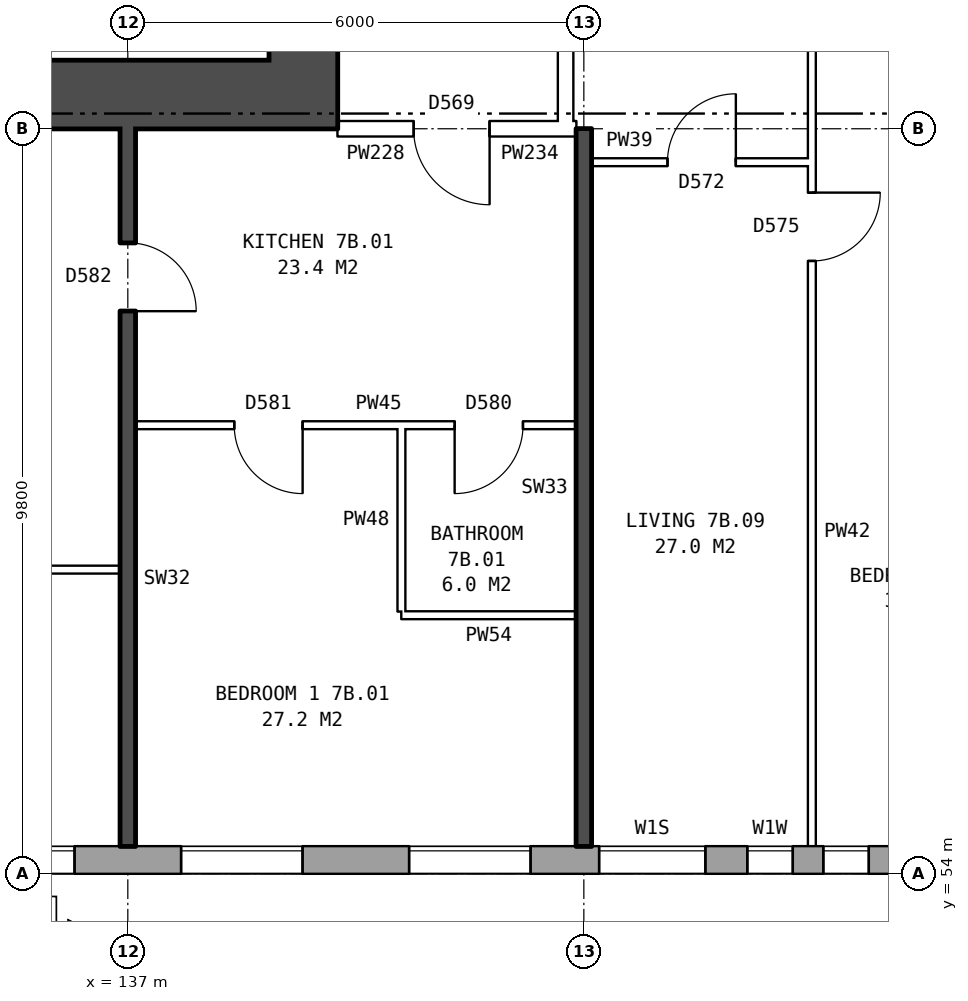
"""IFC4 building model, lengths in metres.
Left out: names, types, materials, properties, quantities, classifications, styles, units other than length and angle.
Written with IfcOpenShell. Run it as: python <this file> out.ifc"""

import sys

from ifc_helpers import new_model, si_unit, direction, frame, frame_2d, origin, place, context, subcontext, project, spatial, rectangle, extrude, element, fill, save


model = new_model("IFC4")
c1 = context("Model", 3, precision=1e-05, world=origin(), true_north=direction((0.0, 1.0)))
c2 = subcontext(c1, "Body", "Model", "MODEL_VIEW")
j1 = project(units=[si_unit("LENGTHUNIT", "METRE"), si_unit("PLANEANGLEUNIT", "RADIAN")], contexts=[c1])
p1 = place(None, origin())
s1 = spatial("IfcSite", under=j1, at=p1, CompositionType="ELEMENT")
p2 = place(p1, origin())
s2 = spatial("IfcBuilding", under=s1, at=p2, CompositionType="ELEMENT")
p3 = place(p2, frame((0.0, 0.0, 28.8)))
s3 = spatial("IfcBuildingStorey", under=s2, at=p3, CompositionType="ELEMENT", Elevation=28.8)
p4 = place(p3, frame((134.075, 54.18, 0.0), z_axis=(0.0, 0.0, 1.0), x_axis=(1.0, 0.0, 0.0)))
e1 = element("IfcWall", 1, at=p4, inside=s3, PredefinedType="STANDARD", context=c2, shape_type="SweptSolid", body=[
    extrude(rectangle(XDim=40.601, YDim=0.36, at=frame_2d((20.3, 0.0))), origin(), (0.0, 0.0, 1.0), 2.85),
])
p5 = place(p4, frame((0.625, 0.0, 0.8)))
e2 = element("IfcOpeningElement", 2, at=p5, cuts=e1, PredefinedType="OPENING", context=c2, shape_type="SweptSolid", body=[
    extrude(rectangle(XDim=1.6, YDim=1.8, at=frame_2d((0.8, 0.9))), frame((0.0, 0.19, 0.0), z_axis=(0.0, -1.0, 0.0), x_axis=(1.0, 0.0, 0.0)), (0.0, 0.0, 1.0), 0.38),
])
p6 = place(p4, frame((3.625, 0.0, 0.8)))
e3 = element("IfcOpeningElement", 3, at=p6, cuts=e1, PredefinedType="OPENING", context=c2, shape_type="SweptSolid", body=[
    extrude(rectangle(XDim=1.6, YDim=1.8, at=frame_2d((0.8, 0.9))), frame((0.0, 0.19, 0.0), z_axis=(0.0, -1.0, 0.0), x_axis=(1.0, 0.0, 0.0)), (0.0, 0.0, 1.0), 0.38),
])
p7 = place(p4, frame((6.625, 0.0, 0.8)))
e4 = element("IfcOpeningElement", 4, at=p7, cuts=e1, PredefinedType="OPENING", context=c2, shape_type="SweptSolid", body=[
    extrude(rectangle(XDim=1.6, YDim=1.8, at=frame_2d((0.8, 0.9))), frame((0.0, 0.19, 0.0), z_axis=(0.0, -1.0, 0.0), x_axis=(1.0, 0.0, 0.0)), (0.0, 0.0, 1.0), 0.38),
])
p8 = place(p4, frame((9.125, 0.0, 1.65)))
e5 = element("IfcOpeningElement", 5, at=p8, cuts=e1, PredefinedType="OPENING", context=c2, shape_type="SweptSolid", body=[
    extrude(rectangle(XDim=1.4, YDim=0.9, at=frame_2d((0.7, 0.45))), frame((0.0, 0.19, 0.0), z_axis=(0.0, -1.0, 0.0), x_axis=(1.0, 0.0, 0.0)), (0.0, 0.0, 1.0), 0.38),
])
p9 = place(p4, frame((12.075, 0.0, 0.8)))
e6 = element("IfcOpeningElement", 6, at=p9, cuts=e1, PredefinedType="OPENING", context=c2, shape_type="SweptSolid", body=[
    extrude(rectangle(XDim=0.6, YDim=0.9, at=frame_2d((0.3, 0.45))), frame((0.0, 0.19, 0.0), z_axis=(0.0, -1.0, 0.0), x_axis=(1.0, 0.0, 0.0)), (0.0, 0.0, 1.0), 0.38),
])
p10 = place(p4, frame((15.625, 0.0, 0.8)))
e7 = element("IfcOpeningElement", 7, at=p10, cuts=e1, PredefinedType="OPENING", context=c2, shape_type="SweptSolid", body=[
    extrude(rectangle(XDim=1.6, YDim=1.8, at=frame_2d((0.8, 0.9))), frame((0.0, 0.19, 0.0), z_axis=(0.0, -1.0, 0.0), x_axis=(1.0, 0.0, 0.0)), (0.0, 0.0, 1.0), 0.38),
])
p11 = place(p4, frame((18.625, 0.0, 0.8)))
e8 = element("IfcOpeningElement", 8, at=p11, cuts=e1, PredefinedType="OPENING", context=c2, shape_type="SweptSolid", body=[
    extrude(rectangle(XDim=1.6, YDim=1.8, at=frame_2d((0.8, 0.9))), frame((0.0, 0.19, 0.0), z_axis=(0.0, -1.0, 0.0), x_axis=(1.0, 0.0, 0.0)), (0.0, 0.0, 1.0), 0.38),
])
p12 = place(p4, frame((21.625, 0.0, 0.8)))
e9 = element("IfcOpeningElement", 9, at=p12, cuts=e1, PredefinedType="OPENING", context=c2, shape_type="SweptSolid", body=[
    extrude(rectangle(XDim=1.6, YDim=1.8, at=frame_2d((0.8, 0.9))), frame((0.0, 0.19, 0.0), z_axis=(0.0, -1.0, 0.0), x_axis=(1.0, 0.0, 0.0)), (0.0, 0.0, 1.0), 0.38),
])
p13 = place(p4, frame((24.625, 0.0, 0.8)))
e10 = element("IfcOpeningElement", 10, at=p13, cuts=e1, PredefinedType="OPENING", context=c2, shape_type="SweptSolid", body=[
    extrude(rectangle(XDim=1.6, YDim=1.8, at=frame_2d((0.8, 0.9))), frame((0.0, 0.19, 0.0), z_axis=(0.0, -1.0, 0.0), x_axis=(1.0, 0.0, 0.0)), (0.0, 0.0, 1.0), 0.38),
])
p14 = place(p4, frame((27.125, 0.0, 0.65)))
e11 = element("IfcOpeningElement", 11, at=p14, cuts=e1, PredefinedType="OPENING", context=c2, shape_type="SweptSolid", body=[
    extrude(rectangle(XDim=0.6, YDim=1.8, at=frame_2d((0.3, 0.9))), frame((0.0, 0.19, 0.0), z_axis=(0.0, -1.0, 0.0), x_axis=(1.0, 0.0, 0.0)), (0.0, 0.0, 1.0), 0.38),
])
p15 = place(p4, frame((30.125, 0.0, 1.6)))
e12 = element("IfcOpeningElement", 12, at=p15, cuts=e1, PredefinedType="OPENING", context=c2, shape_type="SweptSolid", body=[
    extrude(rectangle(XDim=0.6, YDim=0.9, at=frame_2d((0.3, 0.45))), frame((0.0, 0.19, 0.0), z_axis=(0.0, -1.0, 0.0), x_axis=(1.0, 0.0, 0.0)), (0.0, 0.0, 1.0), 0.38),
])
p16 = place(p4, frame((33.625, 0.0, 0.8)))
e13 = element("IfcOpeningElement", 13, at=p16, cuts=e1, PredefinedType="OPENING", context=c2, shape_type="SweptSolid", body=[
    extrude(rectangle(XDim=1.6, YDim=1.8, at=frame_2d((0.8, 0.9))), frame((0.0, 0.19, 0.0), z_axis=(0.0, -1.0, 0.0), x_axis=(1.0, 0.0, 0.0)), (0.0, 0.0, 1.0), 0.38),
])
p17 = place(p4, frame((36.625, 0.0, 0.8)))
e14 = element("IfcOpeningElement", 14, at=p17, cuts=e1, PredefinedType="OPENING", context=c2, shape_type="SweptSolid", body=[
    extrude(rectangle(XDim=1.6, YDim=1.8, at=frame_2d((0.8, 0.9))), frame((0.0, 0.19, 0.0), z_axis=(0.0, -1.0, 0.0), x_axis=(1.0, 0.0, 0.0)), (0.0, 0.0, 1.0), 0.38),
])
p18 = place(p4, frame((11.075, 0.0, 0.15)))
e15 = element("IfcOpeningElement", 15, at=p18, cuts=e1, PredefinedType="OPENING", context=c2, shape_type="SweptSolid", body=[
    extrude(rectangle(XDim=0.6, YDim=0.9, at=frame_2d((0.3, 0.45))), frame((0.0, 0.19, 0.0), z_axis=(0.0, -1.0, 0.0), x_axis=(1.0, 0.0, 0.0)), (0.0, 0.0, 1.0), 0.38),
])
p19 = place(p4, frame((13.025, 0.0, 0.8)))
e16 = element("IfcOpeningElement", 16, at=p19, cuts=e1, PredefinedType="OPENING", context=c2, shape_type="SweptSolid", body=[
    extrude(rectangle(XDim=1.6, YDim=1.8, at=frame_2d((0.8, 0.9))), frame((0.0, 0.19, 0.0), z_axis=(0.0, -1.0, 0.0), x_axis=(1.0, 0.0, 0.0)), (0.0, 0.0, 1.0), 0.38),
])
p20 = place(p4, frame((28.025, 0.0, 0.65)))
e17 = element("IfcOpeningElement", 17, at=p20, cuts=e1, PredefinedType="OPENING", context=c2, shape_type="SweptSolid", body=[
    extrude(rectangle(XDim=0.8, YDim=0.9, at=frame_2d((0.4, 0.45))), frame((0.0, 0.19, 0.0), z_axis=(0.0, -1.0, 0.0), x_axis=(1.0, 0.0, 0.0)), (0.0, 0.0, 1.0), 0.38),
])
p21 = place(p4, frame((31.075, 0.0, 0.8)))
e18 = element("IfcOpeningElement", 18, at=p21, cuts=e1, PredefinedType="OPENING", context=c2, shape_type="SweptSolid", body=[
    extrude(rectangle(XDim=1.6, YDim=1.8, at=frame_2d((0.8, 0.9))), frame((0.0, 0.19, 0.0), z_axis=(0.0, -1.0, 0.0), x_axis=(1.0, 0.0, 0.0)), (0.0, 0.0, 1.0), 0.38),
])
p22 = place(p3, frame((139.31, 64.7, 0.0), z_axis=(0.0, 0.0, 1.0), x_axis=(0.0, 1.0, 0.0)))
e19 = element("IfcWall", 19, at=p22, inside=s3, PredefinedType="SHEAR", context=c2, shape_type="SweptSolid", body=[
    extrude(rectangle(XDim=10.6, YDim=0.9, at=frame_2d((5.3, 0.0))), origin(), (0.0, 0.0, 1.0), 2.85),
])
p23 = place(p22, frame((0.425, 0.0, 0.0)))
e20 = element("IfcOpeningElement", 20, at=p23, cuts=e19, PredefinedType="OPENING", context=c2, shape_type="SweptSolid", body=[
    extrude(rectangle(XDim=1.1, YDim=2.1, at=frame_2d((0.55, 1.05))), frame((0.0, 0.46, 0.0), z_axis=(0.0, -1.0, 0.0), x_axis=(1.0, 0.0, 0.0)), (0.0, 0.0, 1.0), 0.92),
])
p24 = place(p22, frame((9.0, 0.0, 0.0)))
e21 = element("IfcOpeningElement", 21, at=p24, cuts=e19, PredefinedType="OPENING", context=c2, shape_type="SweptSolid", body=[
    extrude(rectangle(XDim=1.1, YDim=2.1, at=frame_2d((0.55, 1.05))), frame((0.0, 0.46, 0.0), z_axis=(0.0, -1.0, 0.0), x_axis=(1.0, 0.0, 0.0)), (0.0, 0.0, 1.0), 0.92),
])
p25 = place(p22, frame((7.225, 0.0, 0.0)))
e22 = element("IfcOpeningElement", 22, at=p25, cuts=e19, PredefinedType="OPENING", context=c2, shape_type="SweptSolid", body=[
    extrude(rectangle(XDim=0.85, YDim=2.1, at=frame_2d((0.425, 1.05))), frame((0.0, 0.46, 0.0), z_axis=(0.0, -1.0, 0.0), x_axis=(1.0, 0.0, 0.0)), (0.0, 0.0, 1.0), 0.92),
])
p26 = place(p3, frame((139.76, 64.25, 0.0), z_axis=(0.0, 0.0, 1.0), x_axis=(-1.0, 0.0, 0.0)))
e23 = element("IfcWall", 23, at=p26, inside=s3, PredefinedType="SHEAR", context=c2, shape_type="SweptSolid", body=[
    extrude(rectangle(XDim=8.4, YDim=0.9, at=frame_2d((4.2, 0.0))), origin(), (0.0, 0.0, 1.0), 2.85),
])
p27 = place(p3, frame((142.76, 63.9, 0.0), z_axis=(0.0, 0.0, 1.0), x_axis=(0.0, 1.0, 0.0)))
e24 = element("IfcWall", 24, at=p27, inside=s3, PredefinedType="PARTITIONING", context=c2, shape_type="SweptSolid", body=[
    extrude(rectangle(XDim=12.2, YDim=0.2, at=frame_2d((6.1, 0.0))), origin(), (0.0, 0.0, 1.0), 2.85),
])
p28 = place(p27, frame((5.1, 0.0, 0.0)))
e25 = element("IfcOpeningElement", 25, at=p28, cuts=e24, PredefinedType="OPENING", context=c2, shape_type="SweptSolid", body=[
    extrude(rectangle(XDim=2.0, YDim=2.1, at=frame_2d((1.0, 1.05))), frame((0.0, 0.11, 0.0), z_axis=(0.0, -1.0, 0.0), x_axis=(1.0, 0.0, 0.0)), (0.0, 0.0, 1.0), 0.22),
])
p29 = place(p3, frame((140.6, 57.4, 0.0), z_axis=(0.0, 0.0, 1.0), x_axis=(1.0, 0.0, 0.0)))
e26 = element("IfcWall", 26, at=p29, inside=s3, PredefinedType="PARTITIONING", context=c2, shape_type="SweptSolid", body=[
    extrude(rectangle(XDim=2.3, YDim=0.1, at=frame_2d((1.15, 0.0))), origin(), (0.0, 0.0, 1.0), 2.85),
])
p30 = place(p3, frame((131.36, 58.0, 0.0), z_axis=(0.0, 0.0, 1.0), x_axis=(1.0, 0.0, 0.0)))
e27 = element("IfcWall", 27, at=p30, inside=s3, PredefinedType="PARTITIONING", context=c2, shape_type="SweptSolid", body=[
    extrude(rectangle(XDim=5.54, YDim=0.1, at=frame_2d((2.77, 0.0))), origin(), (0.0, 0.0, 1.0), 2.85),
])
p31 = place(p30, frame((2.32, 0.0, 0.0)))
e28 = element("IfcOpeningElement", 28, at=p31, cuts=e27, PredefinedType="OPENING", context=c2, shape_type="SweptSolid", body=[
    extrude(rectangle(XDim=0.9, YDim=2.1, at=frame_2d((0.45, 1.05))), frame((0.0, 0.06, 0.0), z_axis=(0.0, -1.0, 0.0), x_axis=(1.0, 0.0, 0.0)), (0.0, 0.0, 1.0), 0.12),
])
p32 = place(p3, frame((137.1, 59.9, 0.0), z_axis=(0.0, 0.0, 1.0), x_axis=(1.0, 0.0, 0.0)))
e29 = element("IfcWall", 29, at=p32, inside=s3, PredefinedType="PARTITIONING", context=c2, shape_type="SweptSolid", body=[
    extrude(rectangle(XDim=5.8, YDim=0.1, at=frame_2d((2.9, 0.0))), origin(), (0.0, 0.0, 1.0), 2.85),
])
p33 = place(p32, frame((1.3, 0.0, 0.0)))
e30 = element("IfcOpeningElement", 30, at=p33, cuts=e29, PredefinedType="OPENING", context=c2, shape_type="SweptSolid", body=[
    extrude(rectangle(XDim=0.9, YDim=2.1, at=frame_2d((0.45, 1.05))), frame((0.0, 0.06, 0.0), z_axis=(0.0, -1.0, 0.0), x_axis=(1.0, 0.0, 0.0)), (0.0, 0.0, 1.0), 0.12),
])
p34 = place(p32, frame((4.2, 0.0, 0.0)))
e31 = element("IfcOpeningElement", 31, at=p34, cuts=e29, PredefinedType="OPENING", context=c2, shape_type="SweptSolid", body=[
    extrude(rectangle(XDim=0.9, YDim=2.1, at=frame_2d((0.45, 1.05))), frame((0.0, 0.06, 0.0), z_axis=(0.0, -1.0, 0.0), x_axis=(1.0, 0.0, 0.0)), (0.0, 0.0, 1.0), 0.12),
])
p35 = place(p3, frame((143.1, 63.36, 0.0), z_axis=(0.0, 0.0, 1.0), x_axis=(1.0, 0.0, 0.0)))
e32 = element("IfcWall", 32, at=p35, inside=s3, PredefinedType="PARTITIONING", context=c2, shape_type="SweptSolid", body=[
    extrude(rectangle(XDim=2.9, YDim=0.1, at=frame_2d((1.45, 0.0))), origin(), (0.0, 0.0, 1.0), 2.85),
])
p36 = place(p35, frame((1.0, 0.0, 0.0)))
e33 = element("IfcOpeningElement", 33, at=p36, cuts=e32, PredefinedType="OPENING", context=c2, shape_type="SweptSolid", body=[
    extrude(rectangle(XDim=0.9, YDim=2.1, at=frame_2d((0.45, 1.05))), frame((0.0, 0.06, 0.0), z_axis=(0.0, -1.0, 0.0), x_axis=(1.0, 0.0, 0.0)), (0.0, 0.0, 1.0), 0.12),
])
p37 = place(p3, frame((139.76, 63.8, 0.0), z_axis=(0.0, 0.0, 1.0), x_axis=(1.0, 0.0, 0.0)))
e34 = element("IfcWall", 34, at=p37, inside=s3, PredefinedType="PARTITIONING", context=c2, shape_type="SweptSolid", body=[
    extrude(rectangle(XDim=3.0, YDim=0.2, at=frame_2d((1.5, 0.0))), origin(), (0.0, 0.0, 1.0), 2.85),
])
p38 = place(p37, frame((1.0, 0.0, 0.0)))
e35 = element("IfcOpeningElement", 35, at=p38, cuts=e34, PredefinedType="OPENING", context=c2, shape_type="SweptSolid", body=[
    extrude(rectangle(XDim=1.0, YDim=2.1, at=frame_2d((0.5, 1.05))), frame((0.0, 0.11, 0.0), z_axis=(0.0, -1.0, 0.0), x_axis=(1.0, 0.0, 0.0)), (0.0, 0.0, 1.0), 0.22),
])
p39 = place(p3, frame((142.76, 63.8, 0.0), z_axis=(0.0, 0.0, 1.0), x_axis=(1.0, 0.0, 0.0)))
e36 = element("IfcWall", 36, at=p39, inside=s3, PredefinedType="PARTITIONING", context=c2, shape_type="SweptSolid", body=[
    extrude(rectangle(XDim=0.14, YDim=0.2, at=frame_2d((0.07, 0.0))), origin(), (0.0, 0.0, 1.0), 2.85),
])
p40 = place(p3, frame((137.0, 54.36, 0.0), z_axis=(0.0, 0.0, 1.0), x_axis=(0.0, 1.0, 0.0)))
e37 = element("IfcWall", 37, at=p40, inside=s3, PredefinedType="SOLIDWALL", context=c2, shape_type="SweptSolid", body=[
    extrude(rectangle(XDim=9.44, YDim=0.2, at=frame_2d((4.72, 0.0))), origin(), (0.0, 0.0, 1.0), 2.85),
])
p41 = place(p40, frame((7.04, 0.0, 0.0)))
e38 = element("IfcOpeningElement", 38, at=p41, cuts=e37, PredefinedType="OPENING", context=c2, shape_type="SweptSolid", body=[
    extrude(rectangle(XDim=0.9, YDim=2.1, at=frame_2d((0.45, 1.05))), frame((0.0, 0.11, 0.0), z_axis=(0.0, -1.0, 0.0), x_axis=(1.0, 0.0, 0.0)), (0.0, 0.0, 1.0), 0.22),
])
p42 = place(p3, frame((140.6, 57.45, 0.0), z_axis=(0.0, 0.0, 1.0), x_axis=(0.0, 1.0, 0.0)))
e39 = element("IfcWall", 39, at=p42, inside=s3, PredefinedType="PARTITIONING", context=c2, shape_type="SweptSolid", body=[
    extrude(rectangle(XDim=2.4, YDim=0.1, at=frame_2d((1.2, 0.0))), origin(), (0.0, 0.0, 1.0), 2.85),
])
p43 = place(p3, frame((143.0, 54.36, 0.0), z_axis=(0.0, 0.0, 1.0), x_axis=(0.0, 1.0, 0.0)))
e40 = element("IfcWall", 40, at=p43, inside=s3, PredefinedType="SOLIDWALL", context=c2, shape_type="SweptSolid", body=[
    extrude(rectangle(XDim=9.44, YDim=0.2, at=frame_2d((4.72, 0.0))), origin(), (0.0, 0.0, 1.0), 2.85),
])
p44 = place(p3, frame((146.0, 54.36, 0.0), z_axis=(0.0, 0.0, 1.0), x_axis=(0.0, 1.0, 0.0)))
e41 = element("IfcWall", 41, at=p44, inside=s3, PredefinedType="PARTITIONING", context=c2, shape_type="SweptSolid", body=[
    extrude(rectangle(XDim=14.34, YDim=0.1, at=frame_2d((7.17, 0.0))), origin(), (0.0, 0.0, 1.0), 2.85),
])
p45 = place(p44, frame((7.7, 0.0, 0.0)))
e42 = element("IfcOpeningElement", 42, at=p45, cuts=e41, PredefinedType="OPENING", context=c2, shape_type="SweptSolid", body=[
    extrude(rectangle(XDim=0.9, YDim=2.1, at=frame_2d((0.45, 1.05))), frame((0.0, 0.06, 0.0), z_axis=(0.0, -1.0, 0.0), x_axis=(1.0, 0.0, 0.0)), (0.0, 0.0, 1.0), 0.12),
])
p46 = place(p44, frame((13.04, 0.0, 0.0)))
e43 = element("IfcOpeningElement", 43, at=p46, cuts=e41, PredefinedType="OPENING", context=c2, shape_type="SweptSolid", body=[
    extrude(rectangle(XDim=0.9, YDim=2.1, at=frame_2d((0.45, 1.05))), frame((0.0, 0.06, 0.0), z_axis=(0.0, -1.0, 0.0), x_axis=(1.0, 0.0, 0.0)), (0.0, 0.0, 1.0), 0.12),
])
p47 = place(p5, origin())
e44 = element("IfcWindow", 44, at=p47, inside=s3, PartitioningType="SINGLE_PANEL", PredefinedType="WINDOW", context=c2, shape_type="SweptSolid", body=[
    extrude(rectangle(XDim=1.6, YDim=1.8, at=frame_2d((0.8, 0.9))), frame((0.0, 0.15, 0.0), z_axis=(0.0, -1.0, 0.0), x_axis=(1.0, 0.0, 0.0)), (0.0, 0.0, 1.0), 0.06),
])
fill(e2, e44)
p48 = place(p6, origin())
e45 = element("IfcWindow", 45, at=p48, inside=s3, PartitioningType="SINGLE_PANEL", PredefinedType="WINDOW", context=c2, shape_type="SweptSolid", body=[
    extrude(rectangle(XDim=1.6, YDim=1.8, at=frame_2d((0.8, 0.9))), frame((0.0, 0.15, 0.0), z_axis=(0.0, -1.0, 0.0), x_axis=(1.0, 0.0, 0.0)), (0.0, 0.0, 1.0), 0.06),
])
fill(e3, e45)
p49 = place(p7, origin())
e46 = element("IfcWindow", 46, at=p49, inside=s3, PartitioningType="SINGLE_PANEL", PredefinedType="WINDOW", context=c2, shape_type="SweptSolid", body=[
    extrude(rectangle(XDim=1.6, YDim=1.8, at=frame_2d((0.8, 0.9))), frame((0.0, 0.15, 0.0), z_axis=(0.0, -1.0, 0.0), x_axis=(1.0, 0.0, 0.0)), (0.0, 0.0, 1.0), 0.06),
])
fill(e4, e46)
p50 = place(p8, origin())
e47 = element("IfcWindow", 47, at=p50, inside=s3, PartitioningType="SINGLE_PANEL", PredefinedType="WINDOW", context=c2, shape_type="SweptSolid", body=[
    extrude(rectangle(XDim=1.4, YDim=0.9, at=frame_2d((0.7, 0.45))), frame((0.0, 0.15, 0.0), z_axis=(0.0, -1.0, 0.0), x_axis=(1.0, 0.0, 0.0)), (0.0, 0.0, 1.0), 0.06),
])
fill(e5, e47)
p51 = place(p9, origin())
e48 = element("IfcWindow", 48, at=p51, inside=s3, PartitioningType="SINGLE_PANEL", PredefinedType="WINDOW", context=c2, shape_type="SweptSolid", body=[
    extrude(rectangle(XDim=0.6, YDim=0.9, at=frame_2d((0.3, 0.45))), frame((0.0, 0.15, 0.0), z_axis=(0.0, -1.0, 0.0), x_axis=(1.0, 0.0, 0.0)), (0.0, 0.0, 1.0), 0.06),
])
fill(e6, e48)
p52 = place(p33, frame((0.9, 0.0, 0.0), z_axis=(0.0, 0.0, 1.0), x_axis=(-1.0, 0.0, 0.0)))
e49 = element("IfcDoor", 49, at=p52, inside=s3, OperationType="SINGLE_SWING_LEFT", PredefinedType="DOOR", context=c2, shape_type="SweptSolid", body=[
    extrude(rectangle(XDim=0.9, YDim=2.1, at=frame_2d((0.45, 1.05))), frame((0.0, 0.025, 0.0), z_axis=(0.0, -1.0, 0.0), x_axis=(1.0, 0.0, 0.0)), (0.0, 0.0, 1.0), 0.05),
])
fill(e30, e49)
p53 = place(p38, frame((1.0, 0.0, 0.0), z_axis=(0.0, 0.0, 1.0), x_axis=(-1.0, 0.0, 0.0)))
e50 = element("IfcDoor", 50, at=p53, inside=s3, OperationType="SINGLE_SWING_LEFT", PredefinedType="DOOR", context=c2, shape_type="SweptSolid", body=[
    extrude(rectangle(XDim=1.0, YDim=2.1, at=frame_2d((0.5, 1.05))), frame((0.0, 0.025, 0.0), z_axis=(0.0, -1.0, 0.0), x_axis=(1.0, 0.0, 0.0)), (0.0, 0.0, 1.0), 0.05),
])
fill(e35, e50)
p54 = place(p41, frame((0.9, 0.0, 0.0), z_axis=(0.0, 0.0, 1.0), x_axis=(-1.0, 0.0, 0.0)))
e51 = element("IfcDoor", 51, at=p54, inside=s3, OperationType="SINGLE_SWING_RIGHT", PredefinedType="DOOR", context=c2, shape_type="SweptSolid", body=[
    extrude(rectangle(XDim=0.9, YDim=2.1, at=frame_2d((0.45, 1.05))), frame((0.0, 0.025, 0.0), z_axis=(0.0, -1.0, 0.0), x_axis=(1.0, 0.0, 0.0)), (0.0, 0.0, 1.0), 0.05),
])
fill(e38, e51)
p55 = place(p34, frame((0.9, 0.0, 0.0), z_axis=(0.0, 0.0, 1.0), x_axis=(-1.0, 0.0, 0.0)))
e52 = element("IfcDoor", 52, at=p55, inside=s3, OperationType="SINGLE_SWING_RIGHT", PredefinedType="DOOR", context=c2, shape_type="SweptSolid", body=[
    extrude(rectangle(XDim=0.9, YDim=2.1, at=frame_2d((0.45, 1.05))), frame((0.0, 0.025, 0.0), z_axis=(0.0, -1.0, 0.0), x_axis=(1.0, 0.0, 0.0)), (0.0, 0.0, 1.0), 0.05),
])
fill(e31, e52)
p56 = place(p45, frame((0.9, 0.0, 0.0), z_axis=(0.0, 0.0, 1.0), x_axis=(-1.0, 0.0, 0.0)))
e53 = element("IfcDoor", 53, at=p56, inside=s3, OperationType="SINGLE_SWING_LEFT", PredefinedType="DOOR", context=c2, shape_type="SweptSolid", body=[
    extrude(rectangle(XDim=0.9, YDim=2.1, at=frame_2d((0.45, 1.05))), frame((0.0, 0.025, 0.0), z_axis=(0.0, -1.0, 0.0), x_axis=(1.0, 0.0, 0.0)), (0.0, 0.0, 1.0), 0.05),
])
fill(e42, e53)
p57 = place(p36, origin())
e54 = element("IfcDoor", 54, at=p57, inside=s3, OperationType="SINGLE_SWING_RIGHT", PredefinedType="DOOR", context=c2, shape_type="SweptSolid", body=[
    extrude(rectangle(XDim=0.9, YDim=2.1, at=frame_2d((0.45, 1.05))), frame((0.0, 0.025, 0.0), z_axis=(0.0, -1.0, 0.0), x_axis=(1.0, 0.0, 0.0)), (0.0, 0.0, 1.0), 0.05),
])
fill(e33, e54)
p58 = place(p18, origin())
e55 = element("IfcWindow", 55, at=p58, inside=s3, PartitioningType="SINGLE_PANEL", PredefinedType="WINDOW", context=c2, shape_type="SweptSolid", body=[
    extrude(rectangle(XDim=0.6, YDim=0.9, at=frame_2d((0.3, 0.45))), frame((0.0, 0.15, 0.0), z_axis=(0.0, -1.0, 0.0), x_axis=(1.0, 0.0, 0.0)), (0.0, 0.0, 1.0), 0.06),
])
fill(e15, e55)
save(model, sys.argv[1])
